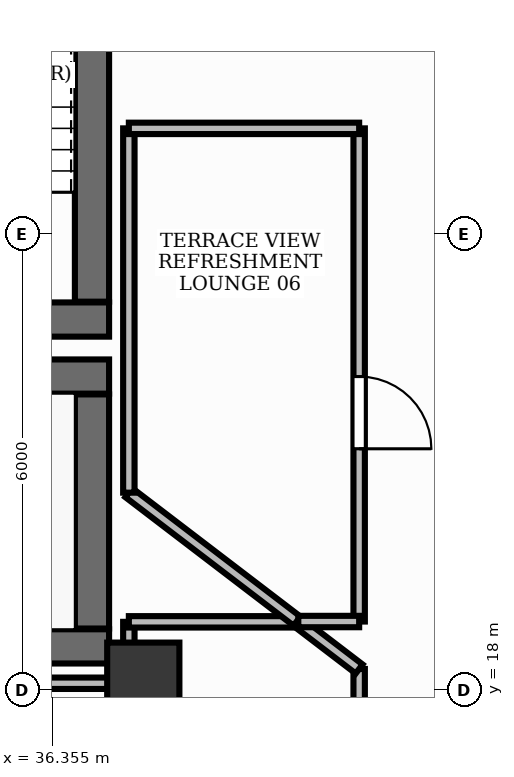
"""IFC4 building model, lengths in metres.
Left out: names, types, materials, properties, quantities, classifications, styles, units other than length and angle.
Written with IfcOpenShell. Run it as: python <this file> out.ifc"""

import sys

from ifc_helpers import new_model, si_unit, direction, frame, frame_2d, origin, origin_2d, place, context, subcontext, project, spatial, rectangle, extrude, element, fill, save


model = new_model("IFC4")
c1 = context("Model", 3, precision=1e-05, world=origin(), true_north=direction((0.0, 1.0)))
c2 = subcontext(c1, "Body", "Model", "MODEL_VIEW")
j1 = project(units=[si_unit("LENGTHUNIT", "METRE"), si_unit("PLANEANGLEUNIT", "RADIAN")], contexts=[c1])
p1 = place(None, origin())
s1 = spatial("IfcSite", under=j1, at=p1, CompositionType="ELEMENT")
p2 = place(p1, origin())
s2 = spatial("IfcBuilding", under=s1, at=p2, CompositionType="ELEMENT")
p3 = place(p2, frame((0.0, 0.0, 34.2)))
s3 = spatial("IfcBuildingStorey", under=s2, at=p3, CompositionType="ELEMENT", Elevation=34.2)
p4 = place(p3, frame((28.852, 18.575, 0.0), z_axis=(0.0, 0.0, 1.0), x_axis=(1.0, 0.0, 0.0)))
e1 = element("IfcWall", 1, at=p4, inside=s3, PredefinedType="SHEAR", context=c2, shape_type="SweptSolid", body=[
    extrude(rectangle(XDim=8.248, YDim=0.45, at=frame_2d((4.124, 0.0))), origin(), (0.0, 0.0, 1.0), 3.9),
])
p5 = place(p3, frame((28.35, 22.125, 0.0), z_axis=(0.0, 0.0, 1.0), x_axis=(1.0, 0.0, 0.0)))
e2 = element("IfcWall", 2, at=p5, inside=s3, PredefinedType="SHEAR", context=c2, shape_type="SweptSolid", body=[
    extrude(rectangle(XDim=8.75, YDim=0.45, at=frame_2d((4.375, 0.0))), origin(), (0.0, 0.0, 1.0), 3.9),
])
p6 = place(p3, frame((36.875, 18.81, 0.0), z_axis=(0.0, 0.0, 1.0), x_axis=(0.0, 1.0, 0.0)))
e3 = element("IfcWall", 3, at=p6, inside=s3, PredefinedType="SHEAR", context=c2, shape_type="SweptSolid", body=[
    extrude(rectangle(XDim=3.08, YDim=0.45, at=frame_2d((1.54, 0.0))), origin(), (0.0, 0.0, 1.0), 3.9),
])
p7 = place(p3, frame((33.1, 22.875, 0.0), z_axis=(0.0, 0.0, 1.0), x_axis=(1.0, 0.0, 0.0)))
e4 = element("IfcWall", 4, at=p7, inside=s3, PredefinedType="SHEAR", context=c2, shape_type="SweptSolid", body=[
    extrude(rectangle(XDim=4.0, YDim=0.45, at=frame_2d((2.0, 0.0))), origin(), (0.0, 0.0, 1.0), 3.9),
])
p8 = place(p3, frame((36.875, 23.11, 0.0), z_axis=(0.0, 0.0, 1.0), x_axis=(0.0, 1.0, 0.0)))
e5 = element("IfcWall", 5, at=p8, inside=s3, PredefinedType="SHEAR", context=c2, shape_type="SweptSolid", body=[
    extrude(rectangle(XDim=7.78, YDim=0.45, at=frame_2d((3.89, 0.0))), origin(), (0.0, 0.0, 1.0), 3.9),
])
p9 = place(p3, frame((37.55, 18.15, -0.0), z_axis=(0.0, 0.0, 1.0), x_axis=(1.0, 0.0, 0.0)))
e6 = element("IfcColumn", 6, at=p9, inside=s3, PredefinedType="PILASTER", context=c2, shape_type="SweptSolid", body=[
    extrude(rectangle(XDim=0.95, YDim=0.95, at=origin_2d()), origin(), (0.0, 0.0, 1.0), 3.901),
])
p10 = place(p3, frame((40.39, 18.278, 0.0), z_axis=(0.0, 0.0, 1.0), x_axis=(0.0, -1.0, 0.0)))
e7 = element("IfcWall", 7, at=p10, inside=s3, PredefinedType="PARTITIONING", context=c2, shape_type="SweptSolid", body=[
    extrude(rectangle(XDim=1.778, YDim=0.15, at=frame_2d((0.889, 0.0))), origin(), (0.0, 0.0, 1.0), 2.91),
])
p11 = place(p10, frame((0.588, 0.0, 0.0)))
e8 = element("IfcOpeningElement", 8, at=p11, cuts=e7, PredefinedType="OPENING", context=c2, shape_type="SweptSolid", body=[
    extrude(rectangle(XDim=0.95, YDim=2.15, at=frame_2d((0.475, 1.075))), frame((0.0, 0.09, 0.0), z_axis=(0.0, -1.0, 0.0), x_axis=(1.0, 0.0, 0.0)), (0.0, 0.0, 1.0), 0.18),
])
p12 = place(p3, frame((40.39, 25.39, 0.0), z_axis=(0.0, 0.0, 1.0), x_axis=(0.0, -1.0, 0.0)))
e9 = element("IfcWall", 9, at=p12, inside=s3, PredefinedType="PARTITIONING", context=c2, shape_type="SweptSolid", body=[
    extrude(rectangle(XDim=6.488, YDim=0.15, at=frame_2d((3.244, 0.0))), origin(), (0.0, 0.0, 1.0), 2.91),
])
p13 = place(p12, frame((3.265, 0.0, 0.0)))
e10 = element("IfcOpeningElement", 10, at=p13, cuts=e9, PredefinedType="OPENING", context=c2, shape_type="SweptSolid", body=[
    extrude(rectangle(XDim=0.95, YDim=2.15, at=frame_2d((0.475, 1.075))), frame((0.0, 0.09, 0.0), z_axis=(0.0, -1.0, 0.0), x_axis=(1.0, 0.0, 0.0)), (0.0, 0.0, 1.0), 0.18),
])
p14 = place(p3, frame((29.0, 18.09, 0.0), z_axis=(0.0, 0.0, 1.0), x_axis=(1.0, 0.0, 0.0)))
e11 = element("IfcWall", 11, at=p14, inside=s3, PredefinedType="PARTITIONING", context=c2, shape_type="SweptSolid", body=[
    extrude(rectangle(XDim=8.35, YDim=0.15, at=frame_2d((4.175, 0.0))), origin(), (0.0, 0.0, 1.0), 2.91),
])
p15 = place(p3, frame((37.36, 18.1, 0.0), z_axis=(0.0, 0.0, 1.0), x_axis=(0.0, 1.0, 0.0)))
e12 = element("IfcWall", 12, at=p15, inside=s3, PredefinedType="PARTITIONING", context=c2, shape_type="SweptSolid", body=[
    extrude(rectangle(XDim=0.798, YDim=0.15, at=frame_2d((0.399, 0.0))), origin(), (0.0, 0.0, 1.0), 2.91),
])
p16 = place(p3, frame((37.36, 18.898, 0.0), z_axis=(0.0, 0.0, 1.0), x_axis=(1.0, 0.0, 0.0)))
e13 = element("IfcWall", 13, at=p16, inside=s3, PredefinedType="PARTITIONING", context=c2, shape_type="SweptSolid", body=[
    extrude(rectangle(XDim=2.218, YDim=0.15, at=frame_2d((1.109, 0.0))), origin(), (0.0, 0.0, 1.0), 2.91),
])
p17 = place(p3, frame((39.578, 18.898, 0.0), z_axis=(0.0, 0.0, 1.0), x_axis=(0.794690228638, -0.607015189684, 0.0)))
e14 = element("IfcWall", 14, at=p17, inside=s3, PredefinedType="PARTITIONING", context=c2, shape_type="SweptSolid", body=[
    extrude(rectangle(XDim=1.021, YDim=0.15, at=frame_2d((0.511, 0.0))), origin(), (0.0, 0.0, 1.0), 2.91),
])
p18 = place(p3, frame((39.572, 18.908, 0.0), z_axis=(0.0, 0.0, 1.0), x_axis=(-0.794673946055, 0.607036505872, 0.0)))
e15 = element("IfcWall", 15, at=p18, inside=s3, PredefinedType="PARTITIONING", context=c2, shape_type="SweptSolid", body=[
    extrude(rectangle(XDim=2.783, YDim=0.15, at=frame_2d((1.392, 0.0))), origin(), (0.0, 0.0, 1.0), 2.91),
])
p19 = place(p3, frame((37.36, 20.597, 0.0), z_axis=(0.0, 0.0, 1.0), x_axis=(0.0, 1.0, 0.0)))
e16 = element("IfcWall", 16, at=p19, inside=s3, PredefinedType="PARTITIONING", context=c2, shape_type="SweptSolid", body=[
    extrude(rectangle(XDim=4.792, YDim=0.15, at=frame_2d((2.396, 0.0))), origin(), (0.0, 0.0, 1.0), 2.91),
])
p20 = place(p3, frame((37.36, 25.39, 0.0), z_axis=(0.0, 0.0, 1.0), x_axis=(1.0, 0.0, 0.0)))
e17 = element("IfcWall", 17, at=p20, inside=s3, PredefinedType="PARTITIONING", context=c2, shape_type="SweptSolid", body=[
    extrude(rectangle(XDim=3.03, YDim=0.15, at=frame_2d((1.515, 0.0))), origin(), (0.0, 0.0, 1.0), 2.91),
])
p21 = place(p3, frame((40.39, 18.902, 0.0), z_axis=(0.0, 0.0, 1.0), x_axis=(-1.0, 0.0, 0.0)))
e18 = element("IfcWall", 18, at=p21, inside=s3, PredefinedType="PARTITIONING", context=c2, shape_type="SweptSolid", body=[
    extrude(rectangle(XDim=0.8, YDim=0.15, at=frame_2d((0.4, 0.0))), origin(), (0.0, 0.0, 1.0), 2.91),
])
p22 = place(p13, origin())
e19 = element("IfcDoor", 19, at=p22, inside=s3, OperationType="SINGLE_SWING_RIGHT", PredefinedType="DOOR", context=c2, shape_type="SweptSolid", body=[
    extrude(rectangle(XDim=0.95, YDim=2.15, at=frame_2d((0.475, 1.075))), frame((0.0, 0.025, 0.0), z_axis=(0.0, -1.0, 0.0), x_axis=(1.0, 0.0, 0.0)), (0.0, 0.0, 1.0), 0.05),
])
fill(e10, e19)
save(model, sys.argv[1])
